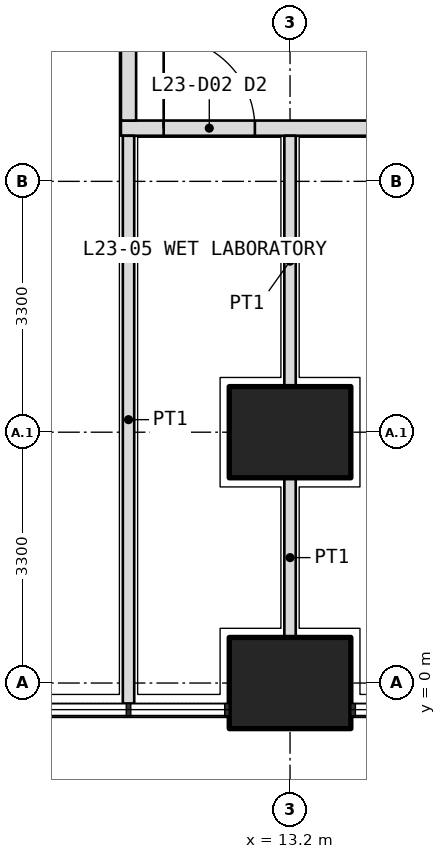
"""IFC4 building model, lengths in metres.
Left out: names, types, materials, properties, quantities, classifications, styles, units other than length and angle.
Written with IfcOpenShell. Run it as: python <this file> out.ifc"""

import sys

from ifc_helpers import new_model, si_unit, direction, frame, frame_2d, origin, origin_2d, place, context, subcontext, project, spatial, rectangle, extrude, element, fill, save


model = new_model("IFC4")
c1 = context("Model", 3, precision=1e-05, world=origin(), true_north=direction((0.0, 1.0)))
c2 = subcontext(c1, "Body", "Model", "MODEL_VIEW")
j1 = project(units=[si_unit("LENGTHUNIT", "METRE"), si_unit("PLANEANGLEUNIT", "RADIAN")], contexts=[c1])
p1 = place(None, origin())
s1 = spatial("IfcSite", under=j1, at=p1, CompositionType="ELEMENT")
p2 = place(p1, origin())
s2 = spatial("IfcBuilding", under=s1, at=p2, CompositionType="ELEMENT")
p3 = place(p2, frame((0.0, 0.0, 103.2)))
s3 = spatial("IfcBuildingStorey", under=s2, at=p3, CompositionType="ELEMENT", Elevation=103.2)
for number, where, z_axis, x_axis in (
    (1, (13.2, 0.0, 0.0), (0.0, 0.0, 1.0), (1.0, 0.0, 0.0)),
    (2, (13.2, 3.3, 0.0), (0.0, 0.0, 1.0), (1.0, 0.0, 0.0)),
):
    element("IfcColumn", number, at=place(p3, frame(where, z_axis=z_axis, x_axis=x_axis)), inside=s3, PredefinedType="COLUMN", context=c2, shape_type="SweptSolid", body=[
        extrude(rectangle(XDim=1.6, YDim=1.2, at=origin_2d()), origin(), (0.0, 0.0, 1.0), 4.2),
    ])
p4 = place(p3, frame((10.975, 7.3, 0.0), z_axis=(0.0, 0.0, 1.0), x_axis=(1.0, 0.0, 0.0)))
e3 = element("IfcWall", 3, at=p4, inside=s3, PredefinedType="PARTITIONING", context=c2, shape_type="SweptSolid", body=[
    extrude(rectangle(XDim=30.85, YDim=0.2, at=frame_2d((15.425, 0.0))), origin(), (0.0, 0.0, 1.0), 2.85),
])
p5 = place(p4, frame((0.562, 0.0, 0.0)))
e4 = element("IfcOpeningElement", 4, at=p5, cuts=e3, PredefinedType="OPENING", context=c2, shape_type="SweptSolid", body=[
    extrude(rectangle(XDim=1.2, YDim=2.1, at=frame_2d((0.6, 1.05))), frame((0.0, 0.11, 0.0), z_axis=(0.0, -1.0, 0.0), x_axis=(1.0, 0.0, 0.0)), (0.0, 0.0, 1.0), 0.22),
])
p6 = place(p4, frame((8.325, 0.0, 0.0)))
e5 = element("IfcOpeningElement", 5, at=p6, cuts=e3, PredefinedType="OPENING", context=c2, shape_type="SweptSolid", body=[
    extrude(rectangle(XDim=1.0, YDim=2.1, at=frame_2d((0.5, 1.05))), frame((0.0, 0.11, 0.0), z_axis=(0.0, -1.0, 0.0), x_axis=(1.0, 0.0, 0.0)), (0.0, 0.0, 1.0), 0.22),
])
p7 = place(p4, frame((16.475, 0.0, 0.0)))
e6 = element("IfcOpeningElement", 6, at=p7, cuts=e3, PredefinedType="OPENING", context=c2, shape_type="SweptSolid", body=[
    extrude(rectangle(XDim=1.2, YDim=2.1, at=frame_2d((0.6, 1.05))), frame((0.0, 0.11, 0.0), z_axis=(0.0, -1.0, 0.0), x_axis=(1.0, 0.0, 0.0)), (0.0, 0.0, 1.0), 0.22),
])
p8 = place(p4, frame((21.525, 0.0, 0.0)))
e7 = element("IfcOpeningElement", 7, at=p8, cuts=e3, PredefinedType="OPENING", context=c2, shape_type="SweptSolid", body=[
    extrude(rectangle(XDim=1.0, YDim=2.1, at=frame_2d((0.5, 1.05))), frame((0.0, 0.11, 0.0), z_axis=(0.0, -1.0, 0.0), x_axis=(1.0, 0.0, 0.0)), (0.0, 0.0, 1.0), 0.22),
])
p9 = place(p4, frame((27.538, 0.0, 0.0)))
e8 = element("IfcOpeningElement", 8, at=p9, cuts=e3, PredefinedType="OPENING", context=c2, shape_type="SweptSolid", body=[
    extrude(rectangle(XDim=1.0, YDim=2.1, at=frame_2d((0.5, 1.05))), frame((0.0, 0.11, 0.0), z_axis=(0.0, -1.0, 0.0), x_axis=(1.0, 0.0, 0.0)), (0.0, 0.0, 1.0), 0.22),
])
p10 = place(p3, frame((11.075, 7.4, 0.0), z_axis=(0.0, 0.0, 1.0), x_axis=(0.0, 1.0, 0.0)))
e9 = element("IfcWall", 9, at=p10, inside=s3, PredefinedType="PARTITIONING", context=c2, shape_type="SweptSolid", body=[
    extrude(rectangle(XDim=27.625, YDim=0.2, at=frame_2d((13.812, 0.0))), origin(), (0.0, 0.0, 1.0), 2.85),
])
p11 = place(p10, frame((2.35, 0.0, 0.0)))
e10 = element("IfcOpeningElement", 10, at=p11, cuts=e9, PredefinedType="OPENING", context=c2, shape_type="SweptSolid", body=[
    extrude(rectangle(XDim=1.0, YDim=2.1, at=frame_2d((0.5, 1.05))), frame((0.0, 0.11, 0.0), z_axis=(0.0, -1.0, 0.0), x_axis=(1.0, 0.0, 0.0)), (0.0, 0.0, 1.0), 0.22),
])
p12 = place(p10, frame((6.35, 0.0, 0.0)))
e11 = element("IfcOpeningElement", 11, at=p12, cuts=e9, PredefinedType="OPENING", context=c2, shape_type="SweptSolid", body=[
    extrude(rectangle(XDim=1.0, YDim=2.1, at=frame_2d((0.5, 1.05))), frame((0.0, 0.11, 0.0), z_axis=(0.0, -1.0, 0.0), x_axis=(1.0, 0.0, 0.0)), (0.0, 0.0, 1.0), 0.22),
])
p13 = place(p10, frame((9.425, 0.0, 0.0)))
e12 = element("IfcOpeningElement", 12, at=p13, cuts=e9, PredefinedType="OPENING", context=c2, shape_type="SweptSolid", body=[
    extrude(rectangle(XDim=0.9, YDim=2.1, at=frame_2d((0.45, 1.05))), frame((0.0, 0.11, 0.0), z_axis=(0.0, -1.0, 0.0), x_axis=(1.0, 0.0, 0.0)), (0.0, 0.0, 1.0), 0.22),
])
p14 = place(p10, frame((13.275, 0.0, 0.0)))
e13 = element("IfcOpeningElement", 13, at=p14, cuts=e9, PredefinedType="OPENING", context=c2, shape_type="SweptSolid", body=[
    extrude(rectangle(XDim=0.9, YDim=2.1, at=frame_2d((0.45, 1.05))), frame((0.0, 0.11, 0.0), z_axis=(0.0, -1.0, 0.0), x_axis=(1.0, 0.0, 0.0)), (0.0, 0.0, 1.0), 0.22),
])
p15 = place(p10, frame((16.8, 0.0, 0.0)))
e14 = element("IfcOpeningElement", 14, at=p15, cuts=e9, PredefinedType="OPENING", context=c2, shape_type="SweptSolid", body=[
    extrude(rectangle(XDim=1.0, YDim=2.1, at=frame_2d((0.5, 1.05))), frame((0.0, 0.11, 0.0), z_axis=(0.0, -1.0, 0.0), x_axis=(1.0, 0.0, 0.0)), (0.0, 0.0, 1.0), 0.22),
])
p16 = place(p10, frame((20.15, 0.0, 0.0)))
e15 = element("IfcOpeningElement", 15, at=p16, cuts=e9, PredefinedType="OPENING", context=c2, shape_type="SweptSolid", body=[
    extrude(rectangle(XDim=1.0, YDim=2.1, at=frame_2d((0.5, 1.05))), frame((0.0, 0.11, 0.0), z_axis=(0.0, -1.0, 0.0), x_axis=(1.0, 0.0, 0.0)), (0.0, 0.0, 1.0), 0.22),
])
p17 = place(p10, frame((24.512, 0.0, 0.0)))
e16 = element("IfcOpeningElement", 16, at=p17, cuts=e9, PredefinedType="OPENING", context=c2, shape_type="SweptSolid", body=[
    extrude(rectangle(XDim=1.0, YDim=2.1, at=frame_2d((0.5, 1.05))), frame((0.0, 0.11, 0.0), z_axis=(0.0, -1.0, 0.0), x_axis=(1.0, 0.0, 0.0)), (0.0, 0.0, 1.0), 0.22),
])
p18 = place(p3, frame((11.075, -0.27, 0.0), z_axis=(0.0, 0.0, 1.0), x_axis=(0.0, 1.0, 0.0)))
e17 = element("IfcWall", 17, at=p18, inside=s3, PredefinedType="PARTITIONING", context=c2, shape_type="SweptSolid", body=[
    extrude(rectangle(XDim=7.47, YDim=0.15, at=frame_2d((3.735, 0.0))), origin(), (0.0, 0.0, 1.0), 2.7),
])
p19 = place(p3, frame((13.2, 0.6, 0.0), z_axis=(0.0, 0.0, 1.0), x_axis=(0.0, 1.0, 0.0)))
e18 = element("IfcWall", 18, at=p19, inside=s3, PredefinedType="PARTITIONING", context=c2, shape_type="SweptSolid", body=[
    extrude(rectangle(XDim=2.1, YDim=0.15, at=frame_2d((1.05, 0.0))), origin(), (0.0, 0.0, 1.0), 2.85),
])
p20 = place(p3, frame((13.2, 3.9, 0.0), z_axis=(0.0, 0.0, 1.0), x_axis=(0.0, 1.0, 0.0)))
e19 = element("IfcWall", 19, at=p20, inside=s3, PredefinedType="PARTITIONING", context=c2, shape_type="SweptSolid", body=[
    extrude(rectangle(XDim=3.3, YDim=0.15, at=frame_2d((1.65, 0.0))), origin(), (0.0, 0.0, 1.0), 2.85),
])
p21 = place(p5, origin())
e20 = element("IfcDoor", 20, at=p21, inside=s3, OperationType="DOUBLE_DOOR_SINGLE_SWING", PredefinedType="DOOR", context=c2, shape_type="SweptSolid", body=[
    extrude(rectangle(XDim=1.2, YDim=2.1, at=frame_2d((0.6, 1.05))), frame((0.0, 0.025, 0.0), z_axis=(0.0, -1.0, 0.0), x_axis=(1.0, 0.0, 0.0)), (0.0, 0.0, 1.0), 0.05),
])
fill(e4, e20)
save(model, sys.argv[1])
